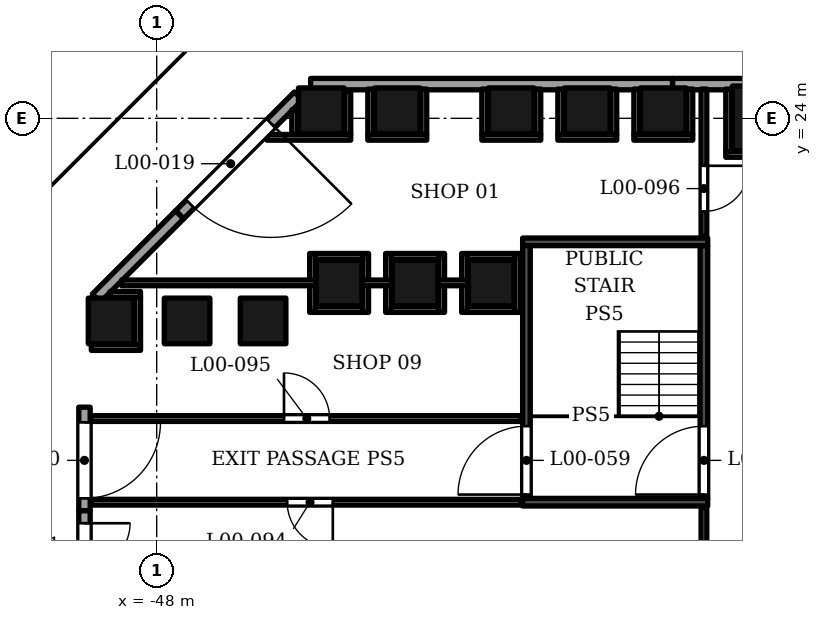
"""IFC4 building model, lengths in metres.
Left out: names, types, materials, properties, quantities, classifications, styles, units other than length and angle.
Written with IfcOpenShell. Run it as: python <this file> out.ifc"""

import sys

from ifc_helpers import new_model, si_unit, direction, frame, frame_2d, origin, origin_2d, place, context, subcontext, project, spatial, rectangle, extrude, element, fill, save


model = new_model("IFC4")
c1 = context("Model", 3, precision=1e-05, world=origin(), true_north=direction((0.0, 1.0)))
c2 = subcontext(c1, "Body", "Model", "MODEL_VIEW")
j1 = project(units=[si_unit("LENGTHUNIT", "METRE"), si_unit("PLANEANGLEUNIT", "RADIAN")], contexts=[c1])
p1 = place(None, origin())
s1 = spatial("IfcSite", under=j1, at=p1, CompositionType="ELEMENT")
p2 = place(p1, origin())
s2 = spatial("IfcBuilding", under=s1, at=p2, CompositionType="ELEMENT")
p3 = place(p2, origin())
s3 = spatial("IfcBuildingStorey", under=s2, at=p3, CompositionType="ELEMENT", Elevation=0.0)
p4 = place(p3, frame((-32.0, 24.0, 0.0), z_axis=(0.0, 0.0, 1.0), x_axis=(1.0, 0.0, 0.0)))
e1 = element("IfcColumn", 1, at=p4, inside=s3, PredefinedType="COLUMN", context=c2, shape_type="SweptSolid", body=[
    extrude(rectangle(XDim=1.7, YDim=1.7, at=origin_2d()), origin(), (0.0, 0.0, 1.0), 9.0),
])
for number, where, z_axis, x_axis in (
    (2, (-39.2, 19.669, 0.0), (0.0, 0.0, 1.0), (1.0, 0.0, 0.0)),
    (3, (-34.669, 24.2, 0.0), (0.0, 0.0, 1.0), (1.0, 0.0, 0.0)),
    (4, (-41.2, 19.669, 0.0), (0.0, 0.0, 1.0), (1.0, 0.0, 0.0)),
    (5, (-36.669, 24.2, 0.0), (0.0, 0.0, 1.0), (1.0, 0.0, 0.0)),
    (6, (-43.2, 19.669, 0.0), (0.0, 0.0, 1.0), (1.0, 0.0, 0.0)),
    (7, (-38.669, 24.2, 0.0), (0.0, 0.0, 1.0), (1.0, 0.0, 0.0)),
    (8, (-45.2, 18.669, 0.0), (0.0, 0.0, 1.0), (1.0, 0.0, 0.0)),
    (9, (-47.2, 18.669, 0.0), (0.0, 0.0, 1.0), (1.0, 0.0, 0.0)),
    (10, (-41.669, 24.2, 0.0), (0.0, 0.0, 1.0), (1.0, 0.0, 0.0)),
    (11, (-49.2, 18.669, 0.0), (0.0, 0.0, 1.0), (1.0, 0.0, 0.0)),
    (12, (-43.669, 24.2, 0.0), (0.0, 0.0, 1.0), (1.0, 0.0, 0.0)),
):
    element("IfcColumn", number, at=place(p3, frame(where, z_axis=z_axis, x_axis=x_axis)), inside=s3, PredefinedType="COLUMN", context=c2, shape_type="SweptSolid", body=[
        extrude(rectangle(XDim=1.2, YDim=1.2, at=origin_2d()), origin(), (0.0, 0.0, 1.0), 9.0),
    ])
for number, where, z_axis, x_axis in (
    (13, (-24.904, 24.9, 0.0), (0.0, 0.0, 1.0), (-1.0, 0.0, 0.0)),
    (14, (-34.427, 24.9, 0.0), (0.0, 0.0, 1.0), (-1.0, 0.0, 0.0)),
):
    element("IfcWall", number, at=place(p3, frame(where, z_axis=z_axis, x_axis=x_axis)), inside=s3, PredefinedType="SOLIDWALL", context=c2, shape_type="SweptSolid", body=[
        extrude(rectangle(XDim=9.523, YDim=0.3, at=frame_2d((4.761, 0.0))), origin(), (0.0, 0.0, 1.0), 7.6),
    ])
p5 = place(p3, frame((-44.271, 24.588, 0.0), z_axis=(0.0, 0.0, 1.0), x_axis=(-0.707079166839, -0.707134394455, 0.0)))
e15 = element("IfcWall", 15, at=p5, inside=s3, PredefinedType="ELEMENTEDWALL", context=c2, shape_type="SweptSolid", body=[
    extrude(rectangle(XDim=4.421, YDim=0.3, at=frame_2d((2.21, 0.0))), origin(), (0.0, 0.0, 1.0), 7.6),
])
p6 = place(p5, frame((1.021, 0.0, 0.0)))
e16 = element("IfcOpeningElement", 16, at=p6, cuts=e15, PredefinedType="OPENING", context=c2, shape_type="SweptSolid", body=[
    extrude(rectangle(XDim=3.0, YDim=2.7, at=frame_2d((1.5, 1.35))), frame((0.0, 0.16, 0.0), z_axis=(0.0, -1.0, 0.0), x_axis=(1.0, 0.0, 0.0)), (0.0, 0.0, 1.0), 0.32),
])
p7 = place(p3, frame((-47.397, 21.462, 0.0), z_axis=(0.0, 0.0, 1.0), x_axis=(-0.707146179809, -0.707067380369, 0.0)))
e17 = element("IfcWall", 17, at=p7, inside=s3, PredefinedType="SOLIDWALL", context=c2, shape_type="SweptSolid", body=[
    extrude(rectangle(XDim=3.098, YDim=0.3, at=frame_2d((1.549, 0.0))), origin(), (0.0, 0.0, 1.0), 7.6),
])
p8 = place(p3, frame((-49.9, 16.4, 0.0), z_axis=(0.0, 0.0, 1.0), x_axis=(0.0, -1.0, 0.0)))
e18 = element("IfcWall", 18, at=p8, inside=s3, PredefinedType="ELEMENTEDWALL", context=c2, shape_type="SweptSolid", body=[
    extrude(rectangle(XDim=2.727, YDim=0.3, at=frame_2d((1.363, 0.0))), origin(), (0.0, 0.0, 1.0), 7.6),
])
p9 = place(p8, frame((0.4, 0.0, 0.0)))
e19 = element("IfcOpeningElement", 19, at=p9, cuts=e18, PredefinedType="OPENING", context=c2, shape_type="SweptSolid", body=[
    extrude(rectangle(XDim=2.0, YDim=2.4, at=frame_2d((1.0, 1.2))), frame((0.0, 0.16, 0.0), z_axis=(0.0, -1.0, 0.0), x_axis=(1.0, 0.0, 0.0)), (0.0, 0.0, 1.0), 0.32),
])
p10 = place(p3, frame((-49.9, 13.673, 0.0), z_axis=(0.0, 0.0, 1.0), x_axis=(0.0, -1.0, 0.0)))
e20 = element("IfcWall", 20, at=p10, inside=s3, PredefinedType="ELEMENTEDWALL", context=c2, shape_type="SweptSolid", body=[
    extrude(rectangle(XDim=4.102, YDim=0.3, at=frame_2d((2.051, 0.0))), origin(), (0.0, 0.0, 1.0), 7.6),
])
p11 = place(p10, frame((0.327, 0.0, 0.0)))
e21 = element("IfcOpeningElement", 21, at=p11, cuts=e20, PredefinedType="OPENING", context=c2, shape_type="SweptSolid", body=[
    extrude(rectangle(XDim=1.2, YDim=2.7, at=frame_2d((0.6, 1.35))), frame((0.0, 0.16, 0.0), z_axis=(0.0, -1.0, 0.0), x_axis=(1.0, 0.0, 0.0)), (0.0, 0.0, 1.0), 0.32),
])
p12 = place(p3, frame((-42.75, 24.85, 9.0), z_axis=(0.0, 0.0, 1.0), x_axis=(-1.0, 0.0, 0.0)))
e22 = element("IfcWall", 22, at=p12, inside=s3, PredefinedType="PARAPET", context=c2, shape_type="SweptSolid", body=[
    extrude(rectangle(XDim=1.25, YDim=0.3, at=frame_2d((0.625, 0.0))), origin(), (0.0, 0.0, 1.0), 1.1),
])
p13 = place(p3, frame((-44.042, 24.745, 9.0), z_axis=(0.0, 0.0, 1.0), x_axis=(-0.7071215324, -0.707092029666, 0.0)))
e23 = element("IfcWall", 23, at=p13, inside=s3, PredefinedType="PARAPET", context=c2, shape_type="SweptSolid", body=[
    extrude(rectangle(XDim=8.275, YDim=0.3, at=frame_2d((4.138, 0.0))), origin(), (0.0, 0.0, 1.0), 1.1),
])
p14 = place(p3, frame((-49.85, 18.79, 9.0), z_axis=(0.0, 0.0, 1.0), x_axis=(0.0, -1.0, 0.0)))
e24 = element("IfcWall", 24, at=p14, inside=s3, PredefinedType="PARAPET", context=c2, shape_type="SweptSolid", body=[
    extrude(rectangle(XDim=14.698, YDim=0.3, at=frame_2d((7.349, 0.0))), origin(), (0.0, 0.0, 1.0), 1.1),
])
for number, where, z_axis, x_axis in (
    (25, (-38.37, 13.9, 0.0), (0.0, 0.0, 1.0), (1.0, 0.0, 0.0)),
    (26, (-38.37, 20.75, 0.0), (0.0, 0.0, 1.0), (1.0, 0.0, 0.0)),
):
    element("IfcWall", number, at=place(p3, frame(where, z_axis=z_axis, x_axis=x_axis)), inside=s3, PredefinedType="SOLIDWALL", context=c2, shape_type="SweptSolid", body=[
        extrude(rectangle(XDim=4.87, YDim=0.2, at=frame_2d((2.435, 0.0))), origin(), (0.0, 0.0, 1.0), 8.5),
    ])
p15 = place(p3, frame((-38.27, 14.0, 0.0), z_axis=(0.0, 0.0, 1.0), x_axis=(0.0, 1.0, 0.0)))
e27 = element("IfcWall", 27, at=p15, inside=s3, PredefinedType="SOLIDWALL", context=c2, shape_type="SweptSolid", body=[
    extrude(rectangle(XDim=6.65, YDim=0.2, at=frame_2d((3.325, 0.0))), origin(), (0.0, 0.0, 1.0), 8.5),
])
p16 = place(p15, frame((0.1, 0.0, 0.0)))
e28 = element("IfcOpeningElement", 28, at=p16, cuts=e27, PredefinedType="OPENING", context=c2, shape_type="SweptSolid", body=[
    extrude(rectangle(XDim=1.8, YDim=2.4, at=frame_2d((0.9, 1.2))), frame((0.0, 0.11, 0.0), z_axis=(0.0, -1.0, 0.0), x_axis=(1.0, 0.0, 0.0)), (0.0, 0.0, 1.0), 0.22),
])
p17 = place(p3, frame((-33.6, 14.0, 0.0), z_axis=(0.0, 0.0, 1.0), x_axis=(0.0, 1.0, 0.0)))
e29 = element("IfcWall", 29, at=p17, inside=s3, PredefinedType="SOLIDWALL", context=c2, shape_type="SweptSolid", body=[
    extrude(rectangle(XDim=6.65, YDim=0.2, at=frame_2d((3.325, 0.0))), origin(), (0.0, 0.0, 1.0), 8.5),
])
p18 = place(p17, frame((0.1, 0.0, 0.0)))
e30 = element("IfcOpeningElement", 30, at=p18, cuts=e29, PredefinedType="OPENING", context=c2, shape_type="SweptSolid", body=[
    extrude(rectangle(XDim=1.8, YDim=2.4, at=frame_2d((0.9, 1.2))), frame((0.0, 0.11, 0.0), z_axis=(0.0, -1.0, 0.0), x_axis=(1.0, 0.0, 0.0)), (0.0, 0.0, 1.0), 0.22),
])
p19 = place(p3, frame((-33.6, 4.69, 0.0), z_axis=(0.0, 0.0, 1.0), x_axis=(0.0, 1.0, 0.0)))
e31 = element("IfcWall", 31, at=p19, inside=s3, PredefinedType="PARTITIONING", context=c2, shape_type="SweptSolid", body=[
    extrude(rectangle(XDim=9.07, YDim=0.15, at=frame_2d((4.535, 0.0))), origin(), (0.0, 0.0, 1.0), 7.3),
])
p20 = place(p3, frame((-49.72, 13.899, 0.0), z_axis=(0.0, 0.0, 1.0), x_axis=(1.0, 0.0, 0.0)))
e32 = element("IfcWall", 32, at=p20, inside=s3, PredefinedType="PARTITIONING", context=c2, shape_type="SweptSolid", body=[
    extrude(rectangle(XDim=11.31, YDim=0.151, at=frame_2d((5.655, 0.0))), origin(), (0.0, 0.0, 1.0), 7.6),
])
p21 = place(p20, frame((5.155, 0.0, 0.0)))
e33 = element("IfcOpeningElement", 33, at=p21, cuts=e32, PredefinedType="OPENING", context=c2, shape_type="SweptSolid", body=[
    extrude(rectangle(XDim=1.2, YDim=2.1, at=frame_2d((0.6, 1.05))), frame((0.0, 0.085, 0.0), z_axis=(0.0, -1.0, 0.0), x_axis=(1.0, 0.0, 0.0)), (0.0, 0.0, 1.0), 0.171),
])
p22 = place(p3, frame((-49.72, 16.101, 0.0), z_axis=(0.0, 0.0, 1.0), x_axis=(1.0, 0.0, 0.0)))
e34 = element("IfcWall", 34, at=p22, inside=s3, PredefinedType="PARTITIONING", context=c2, shape_type="SweptSolid", body=[
    extrude(rectangle(XDim=11.31, YDim=0.151, at=frame_2d((5.655, 0.0))), origin(), (0.0, 0.0, 1.0), 7.6),
])
p23 = place(p22, frame((5.07, 0.0, 0.0)))
e35 = element("IfcOpeningElement", 35, at=p23, cuts=e34, PredefinedType="OPENING", context=c2, shape_type="SweptSolid", body=[
    extrude(rectangle(XDim=1.2, YDim=2.1, at=frame_2d((0.6, 1.05))), frame((0.0, 0.085, 0.0), z_axis=(0.0, -1.0, 0.0), x_axis=(1.0, 0.0, 0.0)), (0.0, 0.0, 1.0), 0.171),
])
p24 = place(p3, frame((-49.72, 17.969, 0.0), z_axis=(0.0, 0.0, 1.0), x_axis=(1.0, 0.0, 0.0)))
e36 = element("IfcWall", 36, at=p24, inside=s3, PredefinedType="PARTITIONING", context=c2, shape_type="SweptSolid", body=[
    extrude(rectangle(XDim=1.295, YDim=0.15, at=frame_2d((0.647, 0.0))), origin(), (0.0, 0.0, 1.0), 8.5),
])
p25 = place(p3, frame((-48.5, 18.044, 0.0), z_axis=(0.0, 0.0, 1.0), x_axis=(0.0, 1.0, 0.0)))
e37 = element("IfcWall", 37, at=p25, inside=s3, PredefinedType="PARTITIONING", context=c2, shape_type="SweptSolid", body=[
    extrude(rectangle(XDim=1.25, YDim=0.15, at=frame_2d((0.625, 0.0))), origin(), (0.0, 0.0, 1.0), 8.5),
])
p26 = place(p3, frame((-43.9, 18.894, 0.0), z_axis=(0.0, 0.0, 1.0), x_axis=(0.0, 1.0, 0.0)))
e38 = element("IfcWall", 38, at=p26, inside=s3, PredefinedType="PARTITIONING", context=c2, shape_type="SweptSolid", body=[
    extrude(rectangle(XDim=1.55, YDim=0.15, at=frame_2d((0.775, 0.0))), origin(), (0.0, 0.0, 1.0), 8.5),
])
p27 = place(p3, frame((-43.825, 18.969, 0.0), z_axis=(0.0, 0.0, 1.0), x_axis=(1.0, 0.0, 0.0)))
e39 = element("IfcWall", 39, at=p27, inside=s3, PredefinedType="PARTITIONING", context=c2, shape_type="SweptSolid", body=[
    extrude(rectangle(XDim=1.25, YDim=0.15, at=frame_2d((0.625, 0.0))), origin(), (0.0, 0.0, 1.0), 8.5),
])
for number, where, z_axis, x_axis in (
    (40, (-42.5, 18.894, 0.0), (0.0, 0.0, 1.0), (0.0, 1.0, 0.0)),
    (41, (-41.9, 18.894, 0.0), (0.0, 0.0, 1.0), (0.0, 1.0, 0.0)),
):
    element("IfcWall", number, at=place(p3, frame(where, z_axis=z_axis, x_axis=x_axis)), inside=s3, PredefinedType="PARTITIONING", context=c2, shape_type="SweptSolid", body=[
        extrude(rectangle(XDim=1.55, YDim=0.15, at=frame_2d((0.775, 0.0))), origin(), (0.0, 0.0, 1.0), 8.5),
    ])
p28 = place(p3, frame((-41.825, 18.969, 0.0), z_axis=(0.0, 0.0, 1.0), x_axis=(1.0, 0.0, 0.0)))
e42 = element("IfcWall", 42, at=p28, inside=s3, PredefinedType="PARTITIONING", context=c2, shape_type="SweptSolid", body=[
    extrude(rectangle(XDim=1.25, YDim=0.15, at=frame_2d((0.625, 0.0))), origin(), (0.0, 0.0, 1.0), 8.5),
])
for number, where, z_axis, x_axis in (
    (43, (-40.5, 18.894, 0.0), (0.0, 0.0, 1.0), (0.0, 1.0, 0.0)),
    (44, (-39.9, 18.894, 0.0), (0.0, 0.0, 1.0), (0.0, 1.0, 0.0)),
):
    element("IfcWall", number, at=place(p3, frame(where, z_axis=z_axis, x_axis=x_axis)), inside=s3, PredefinedType="PARTITIONING", context=c2, shape_type="SweptSolid", body=[
        extrude(rectangle(XDim=1.55, YDim=0.15, at=frame_2d((0.775, 0.0))), origin(), (0.0, 0.0, 1.0), 8.5),
    ])
p29 = place(p3, frame((-39.825, 18.969, 0.0), z_axis=(0.0, 0.0, 1.0), x_axis=(1.0, 0.0, 0.0)))
e45 = element("IfcWall", 45, at=p29, inside=s3, PredefinedType="PARTITIONING", context=c2, shape_type="SweptSolid", body=[
    extrude(rectangle(XDim=1.25, YDim=0.15, at=frame_2d((0.625, 0.0))), origin(), (0.0, 0.0, 1.0), 8.5),
])
p30 = place(p3, frame((-38.5, 18.894, 0.0), z_axis=(0.0, 0.0, 1.0), x_axis=(0.0, 1.0, 0.0)))
e46 = element("IfcWall", 46, at=p30, inside=s3, PredefinedType="PARTITIONING", context=c2, shape_type="SweptSolid", body=[
    extrude(rectangle(XDim=1.55, YDim=0.15, at=frame_2d((0.775, 0.0))), origin(), (0.0, 0.0, 1.0), 8.5),
])
p31 = place(p3, frame((-49.227, 19.369, 0.0), z_axis=(0.0, 0.0, 1.0), x_axis=(1.0, 0.0, 0.0)))
e47 = element("IfcWall", 47, at=p31, inside=s3, PredefinedType="PARTITIONING", context=c2, shape_type="SweptSolid", body=[
    extrude(rectangle(XDim=0.802, YDim=0.15, at=frame_2d((0.401, 0.0))), origin(), (0.0, 0.0, 1.0), 8.5),
])
p32 = place(p3, frame((-48.926, 19.67, 0.0), z_axis=(0.0, 0.0, 1.0), x_axis=(1.0, 0.0, 0.0)))
e48 = element("IfcWall", 48, at=p32, inside=s3, PredefinedType="PARTITIONING", context=c2, shape_type="SweptSolid", body=[
    extrude(rectangle(XDim=5.126, YDim=0.15, at=frame_2d((2.563, 0.0))), origin(), (0.0, 0.0, 1.0), 7.6),
])
for number, where, z_axis, x_axis in (
    (49, (-42.6, 19.67, 0.0), (0.0, 0.0, 1.0), (1.0, 0.0, 0.0)),
    (50, (-40.6, 19.67, 0.0), (0.0, 0.0, 1.0), (1.0, 0.0, 0.0)),
):
    element("IfcWall", number, at=place(p3, frame(where, z_axis=z_axis, x_axis=x_axis)), inside=s3, PredefinedType="PARTITIONING", context=c2, shape_type="SweptSolid", body=[
        extrude(rectangle(XDim=0.8, YDim=0.15, at=frame_2d((0.4, 0.0))), origin(), (0.0, 0.0, 1.0), 8.5),
    ])
for number, where, z_axis, x_axis in (
    (51, (-43.825, 20.369, 0.0), (0.0, 0.0, 1.0), (1.0, 0.0, 0.0)),
    (52, (-41.825, 20.369, 0.0), (0.0, 0.0, 1.0), (1.0, 0.0, 0.0)),
    (53, (-39.825, 20.369, 0.0), (0.0, 0.0, 1.0), (1.0, 0.0, 0.0)),
):
    element("IfcWall", number, at=place(p3, frame(where, z_axis=z_axis, x_axis=x_axis)), inside=s3, PredefinedType="PARTITIONING", context=c2, shape_type="SweptSolid", body=[
        extrude(rectangle(XDim=1.25, YDim=0.15, at=frame_2d((0.625, 0.0))), origin(), (0.0, 0.0, 1.0), 8.5),
    ])
p33 = place(p3, frame((-33.6, 20.89, 0.0), z_axis=(0.0, 0.0, 1.0), x_axis=(0.0, 1.0, 0.0)))
e54 = element("IfcWall", 54, at=p33, inside=s3, PredefinedType="PARTITIONING", context=c2, shape_type="SweptSolid", body=[
    extrude(rectangle(XDim=3.88, YDim=0.15, at=frame_2d((1.94, 0.0))), origin(), (0.0, 0.0, 1.0), 7.6),
])
p34 = place(p33, frame((0.661, 0.0, 0.0)))
e55 = element("IfcOpeningElement", 55, at=p34, cuts=e54, PredefinedType="OPENING", context=c2, shape_type="SweptSolid", body=[
    extrude(rectangle(XDim=1.2, YDim=2.1, at=frame_2d((0.6, 1.05))), frame((0.0, 0.085, 0.0), z_axis=(0.0, -1.0, 0.0), x_axis=(1.0, 0.0, 0.0)), (0.0, 0.0, 1.0), 0.17),
])
p35 = place(p3, frame((-33.025, 23.05, 0.0), z_axis=(0.0, 0.0, 1.0), x_axis=(1.0, 0.0, 0.0)))
e56 = element("IfcWall", 56, at=p35, inside=s3, PredefinedType="PARTITIONING", context=c2, shape_type="SweptSolid", body=[
    extrude(rectangle(XDim=2.05, YDim=0.15, at=frame_2d((1.025, 0.0))), origin(), (0.0, 0.0, 1.0), 7.3),
])
p36 = place(p3, frame((-32.95, 23.125, 0.0), z_axis=(0.0, 0.0, 1.0), x_axis=(0.0, 1.0, 0.0)))
e57 = element("IfcWall", 57, at=p36, inside=s3, PredefinedType="PARTITIONING", context=c2, shape_type="SweptSolid", body=[
    extrude(rectangle(XDim=1.645, YDim=0.15, at=frame_2d((0.823, 0.0))), origin(), (0.0, 0.0, 1.0), 7.6),
])
p37 = place(p3, frame((-45.096, 23.5, 0.0), z_axis=(0.0, 0.0, 1.0), x_axis=(1.0, 0.0, 0.0)))
e58 = element("IfcWall", 58, at=p37, inside=s3, PredefinedType="PARTITIONING", context=c2, shape_type="SweptSolid", body=[
    extrude(rectangle(XDim=2.202, YDim=0.15, at=frame_2d((1.101, 0.0))), origin(), (0.0, 0.0, 1.0), 7.6),
])
for number, where, z_axis, x_axis in (
    (59, (-42.444, 23.5, 0.0), (0.0, 0.0, 1.0), (1.0, 0.0, 0.0)),
    (60, (-39.444, 23.5, 0.0), (0.0, 0.0, 1.0), (1.0, 0.0, 0.0)),
    (61, (-37.444, 23.5, 0.0), (0.0, 0.0, 1.0), (1.0, 0.0, 0.0)),
    (62, (-35.444, 23.5, 0.0), (0.0, 0.0, 1.0), (1.0, 0.0, 0.0)),
):
    element("IfcWall", number, at=place(p3, frame(where, z_axis=z_axis, x_axis=x_axis)), inside=s3, PredefinedType="PARTITIONING", context=c2, shape_type="SweptSolid", body=[
        extrude(rectangle(XDim=1.55, YDim=0.15, at=frame_2d((0.775, 0.0))), origin(), (0.0, 0.0, 1.0), 8.5),
    ])
p38 = place(p3, frame((-44.369, 23.575, 0.0), z_axis=(0.0, 0.0, 1.0), x_axis=(0.0, 1.0, 0.0)))
e63 = element("IfcWall", 63, at=p38, inside=s3, PredefinedType="PARTITIONING", context=c2, shape_type="SweptSolid", body=[
    extrude(rectangle(XDim=0.652, YDim=0.15, at=frame_2d((0.326, 0.0))), origin(), (0.0, 0.0, 1.0), 8.5),
])
p39 = place(p3, frame((-42.969, 23.575, 0.0), z_axis=(0.0, 0.0, 1.0), x_axis=(0.0, 1.0, 0.0)))
e64 = element("IfcWall", 64, at=p39, inside=s3, PredefinedType="PARTITIONING", context=c2, shape_type="SweptSolid", body=[
    extrude(rectangle(XDim=1.145, YDim=0.15, at=frame_2d((0.573, 0.0))), origin(), (0.0, 0.0, 1.0), 8.5),
])
p40 = place(p3, frame((-42.369, 23.575, 0.0), z_axis=(0.0, 0.0, 1.0), x_axis=(0.0, 1.0, 0.0)))
e65 = element("IfcWall", 65, at=p40, inside=s3, PredefinedType="PARTITIONING", context=c2, shape_type="SweptSolid", body=[
    extrude(rectangle(XDim=1.195, YDim=0.15, at=frame_2d((0.598, 0.0))), origin(), (0.0, 0.0, 1.0), 8.5),
])
for number, where, z_axis, x_axis in (
    (66, (-40.969, 23.575, 0.0), (0.0, 0.0, 1.0), (0.0, 1.0, 0.0)),
    (67, (-39.369, 23.575, 0.0), (0.0, 0.0, 1.0), (0.0, 1.0, 0.0)),
):
    element("IfcWall", number, at=place(p3, frame(where, z_axis=z_axis, x_axis=x_axis)), inside=s3, PredefinedType="PARTITIONING", context=c2, shape_type="SweptSolid", body=[
        extrude(rectangle(XDim=1.195, YDim=0.15, at=frame_2d((0.598, 0.0))), origin(), (0.0, 0.0, 1.0), 7.3),
    ])
for number, where, z_axis, x_axis in (
    (68, (-37.969, 23.575, 0.0), (0.0, 0.0, 1.0), (0.0, 1.0, 0.0)),
    (69, (-37.369, 23.575, 0.0), (0.0, 0.0, 1.0), (0.0, 1.0, 0.0)),
    (70, (-35.969, 23.575, 0.0), (0.0, 0.0, 1.0), (0.0, 1.0, 0.0)),
    (71, (-35.369, 23.575, 0.0), (0.0, 0.0, 1.0), (0.0, 1.0, 0.0)),
):
    element("IfcWall", number, at=place(p3, frame(where, z_axis=z_axis, x_axis=x_axis)), inside=s3, PredefinedType="PARTITIONING", context=c2, shape_type="SweptSolid", body=[
        extrude(rectangle(XDim=1.195, YDim=0.15, at=frame_2d((0.598, 0.0))), origin(), (0.0, 0.0, 1.0), 8.5),
    ])
p41 = place(p3, frame((-33.969, 23.575, 0.0), z_axis=(0.0, 0.0, 1.0), x_axis=(0.0, 1.0, 0.0)))
e72 = element("IfcWall", 72, at=p41, inside=s3, PredefinedType="PARTITIONING", context=c2, shape_type="SweptSolid", body=[
    extrude(rectangle(XDim=1.195, YDim=0.15, at=frame_2d((0.598, 0.0))), origin(), (0.0, 0.0, 1.0), 7.6),
])
p42 = place(p6, origin())
e73 = element("IfcDoor", 73, at=p42, inside=s3, OperationType="DOUBLE_DOOR_SINGLE_SWING", PredefinedType="DOOR", context=c2, shape_type="SweptSolid", body=[
    extrude(rectangle(XDim=3.0, YDim=2.7, at=frame_2d((1.5, 1.35))), frame((0.0, 0.025, 0.0), z_axis=(0.0, -1.0, 0.0), x_axis=(1.0, 0.0, 0.0)), (0.0, 0.0, 1.0), 0.05),
])
fill(e16, e73)
p43 = place(p9, origin())
e74 = element("IfcDoor", 74, at=p43, inside=s3, OperationType="DOUBLE_DOOR_SINGLE_SWING", PredefinedType="DOOR", context=c2, shape_type="SweptSolid", body=[
    extrude(rectangle(XDim=2.0, YDim=2.4, at=frame_2d((1.0, 1.2))), frame((0.0, 0.025, 0.0), z_axis=(0.0, -1.0, 0.0), x_axis=(1.0, 0.0, 0.0)), (0.0, 0.0, 1.0), 0.05),
])
fill(e19, e74)
p44 = place(p11, origin())
e75 = element("IfcDoor", 75, at=p44, inside=s3, OperationType="DOUBLE_DOOR_SINGLE_SWING", PredefinedType="DOOR", context=c2, shape_type="SweptSolid", body=[
    extrude(rectangle(XDim=1.2, YDim=2.7, at=frame_2d((0.6, 1.35))), frame((0.0, 0.025, 0.0), z_axis=(0.0, -1.0, 0.0), x_axis=(1.0, 0.0, 0.0)), (0.0, 0.0, 1.0), 0.05),
])
fill(e21, e75)
p45 = place(p18, origin())
e76 = element("IfcDoor", 76, at=p45, inside=s3, OperationType="DOUBLE_DOOR_SINGLE_SWING", PredefinedType="DOOR", context=c2, shape_type="SweptSolid", body=[
    extrude(rectangle(XDim=1.8, YDim=2.4, at=frame_2d((0.9, 1.2))), frame((0.0, 0.025, 0.0), z_axis=(0.0, -1.0, 0.0), x_axis=(1.0, 0.0, 0.0)), (0.0, 0.0, 1.0), 0.05),
])
fill(e30, e76)
p46 = place(p16, origin())
e77 = element("IfcDoor", 77, at=p46, inside=s3, OperationType="DOUBLE_DOOR_SINGLE_SWING", PredefinedType="DOOR", context=c2, shape_type="SweptSolid", body=[
    extrude(rectangle(XDim=1.8, YDim=2.4, at=frame_2d((0.9, 1.2))), frame((0.0, 0.025, 0.0), z_axis=(0.0, -1.0, 0.0), x_axis=(1.0, 0.0, 0.0)), (0.0, 0.0, 1.0), 0.05),
])
fill(e28, e77)
p47 = place(p21, origin())
e78 = element("IfcDoor", 78, at=p47, inside=s3, OperationType="SINGLE_SWING_RIGHT", PredefinedType="DOOR", context=c2, shape_type="SweptSolid", body=[
    extrude(rectangle(XDim=1.2, YDim=2.1, at=frame_2d((0.6, 1.05))), frame((0.0, 0.025, 0.0), z_axis=(0.0, -1.0, 0.0), x_axis=(1.0, 0.0, 0.0)), (0.0, 0.0, 1.0), 0.05),
])
fill(e33, e78)
p48 = place(p23, origin())
e79 = element("IfcDoor", 79, at=p48, inside=s3, OperationType="SINGLE_SWING_LEFT", PredefinedType="DOOR", context=c2, shape_type="SweptSolid", body=[
    extrude(rectangle(XDim=1.2, YDim=2.1, at=frame_2d((0.6, 1.05))), frame((0.0, 0.025, 0.0), z_axis=(0.0, -1.0, 0.0), x_axis=(1.0, 0.0, 0.0)), (0.0, 0.0, 1.0), 0.05),
])
fill(e35, e79)
p49 = place(p34, origin())
e80 = element("IfcDoor", 80, at=p49, inside=s3, OperationType="SINGLE_SWING_RIGHT", PredefinedType="DOOR", context=c2, shape_type="SweptSolid", body=[
    extrude(rectangle(XDim=1.2, YDim=2.1, at=frame_2d((0.6, 1.05))), frame((0.0, 0.025, 0.0), z_axis=(0.0, -1.0, 0.0), x_axis=(1.0, 0.0, 0.0)), (0.0, 0.0, 1.0), 0.05),
])
fill(e55, e80)
save(model, sys.argv[1])
